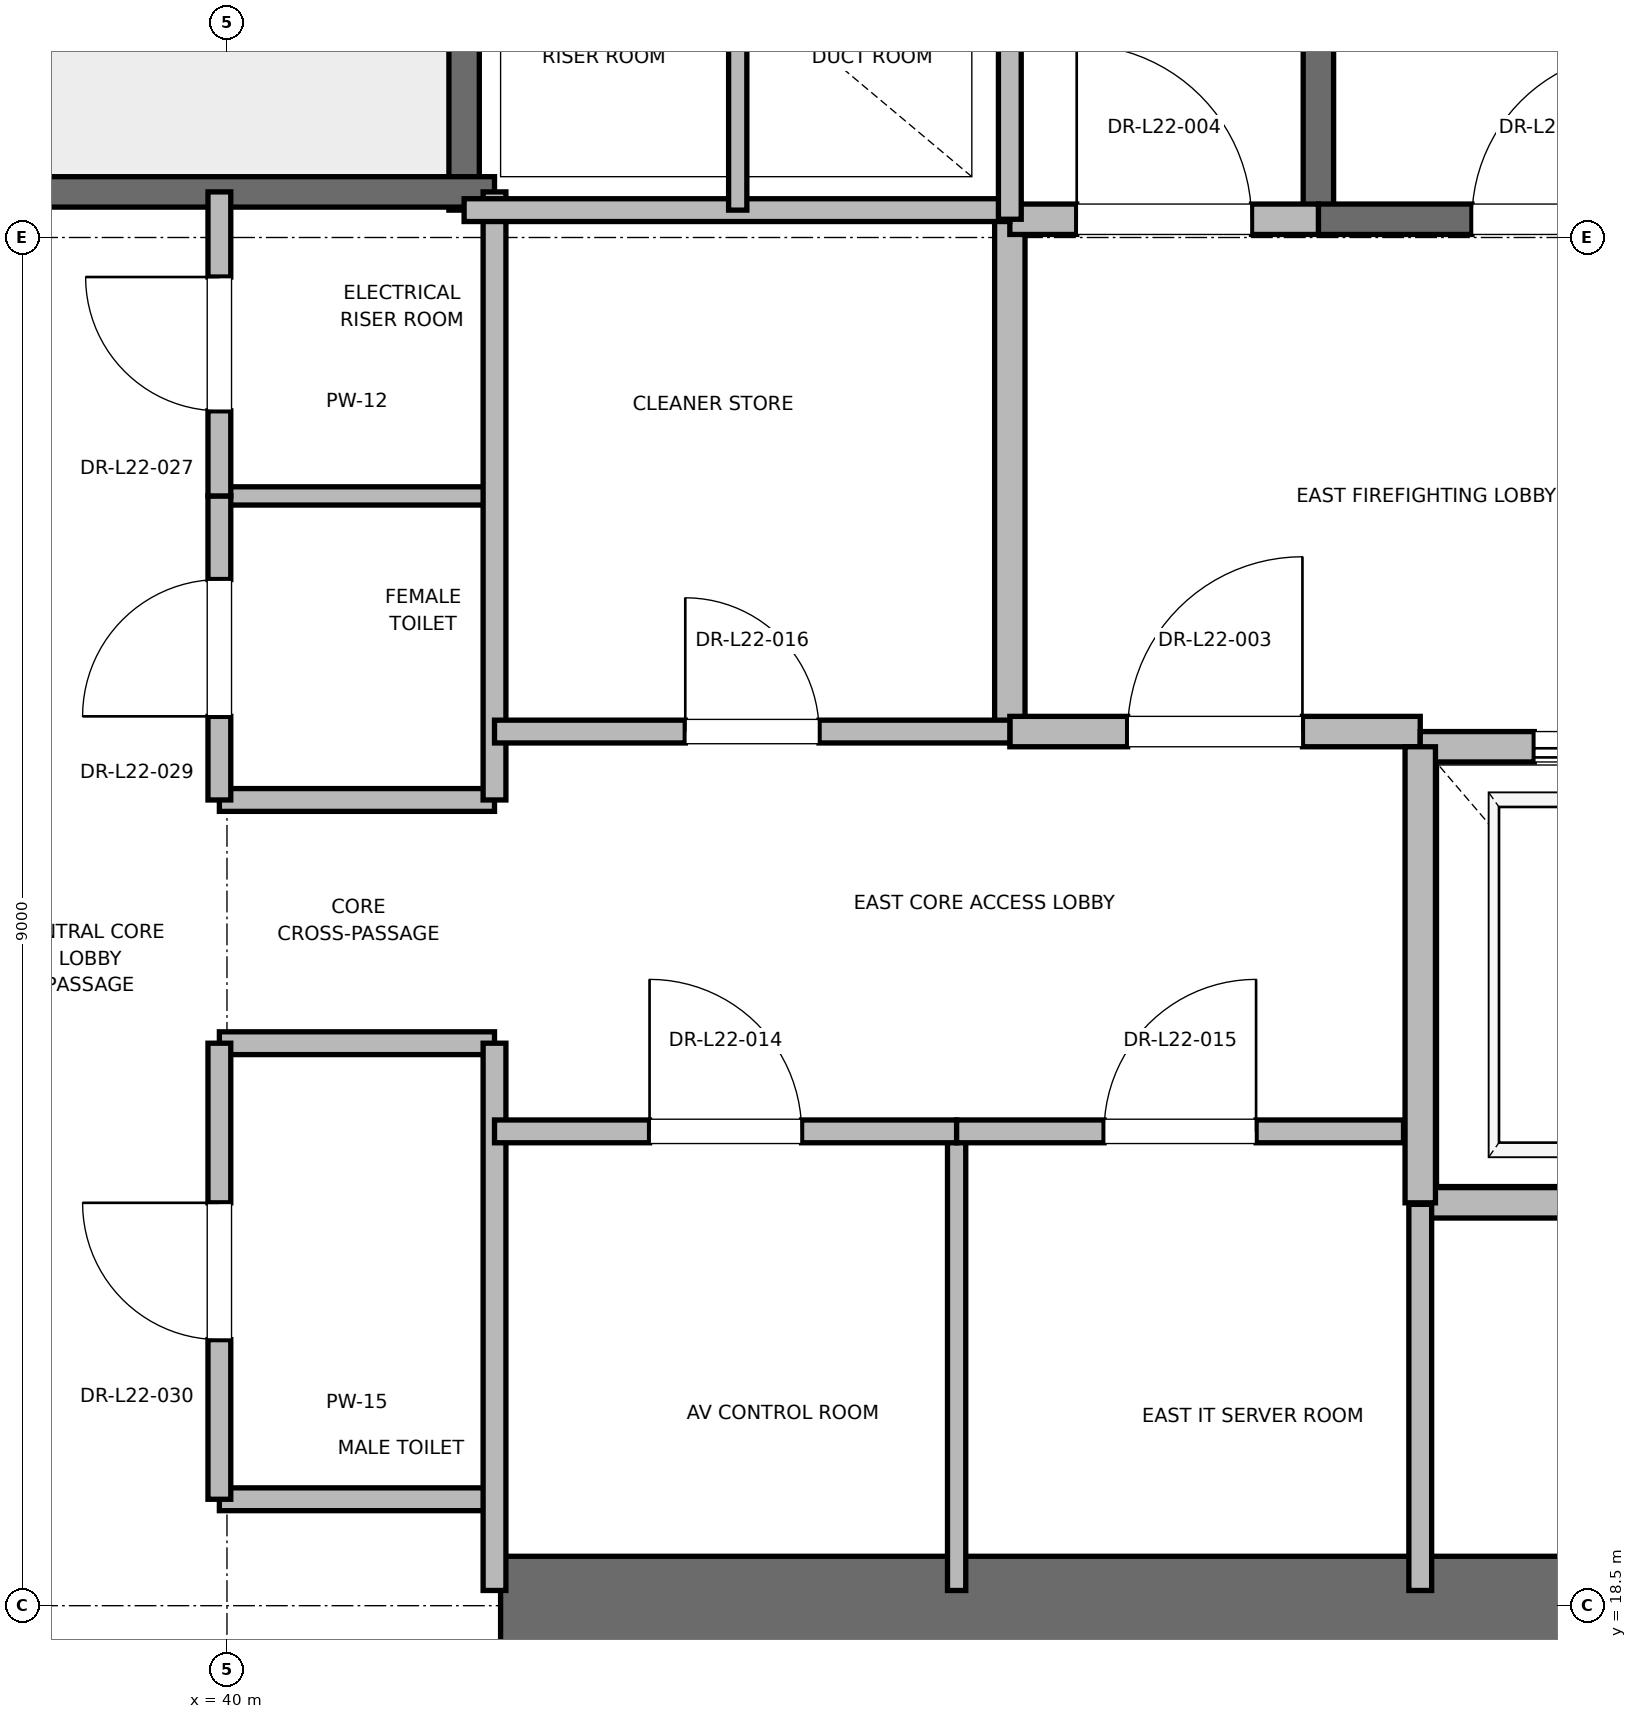
"""IFC4 building model, lengths in metres.
Left out: names, types, materials, properties, quantities, classifications, styles, units other than length and angle.
Written with IfcOpenShell. Run it as: python <this file> out.ifc"""

import sys

from ifc_helpers import new_model, si_unit, direction, frame, frame_2d, origin, place, context, subcontext, project, spatial, rectangle, extrude, element, fill, save


model = new_model("IFC4")
c1 = context("Model", 3, precision=1e-05, world=origin(), true_north=direction((0.0, 1.0)))
c2 = subcontext(c1, "Body", "Model", "MODEL_VIEW")
j1 = project(units=[si_unit("LENGTHUNIT", "METRE"), si_unit("PLANEANGLEUNIT", "RADIAN")], contexts=[c1])
p1 = place(None, origin())
s1 = spatial("IfcSite", under=j1, at=p1, CompositionType="ELEMENT")
p2 = place(p1, origin())
s2 = spatial("IfcBuilding", under=s1, at=p2, CompositionType="ELEMENT")
p3 = place(p2, frame((0.0, 0.0, 95.6)))
s3 = spatial("IfcBuildingStorey", under=s2, at=p3, CompositionType="ELEMENT", Elevation=95.6)
p4 = place(p3, frame((41.8, 18.5, 0.0), z_axis=(0.0, 0.0, 1.0), x_axis=(1.0, 0.0, 0.0)))
e1 = element("IfcWall", 1, at=p4, inside=s3, PredefinedType="SHEAR", context=c2, shape_type="SweptSolid", body=[
    extrude(rectangle(XDim=9.2, YDim=0.65, at=frame_2d((4.6, 0.0))), origin(), (0.0, 0.0, 1.0), 3.76),
])
p5 = place(p3, frame((47.18, 27.62, 0.0), z_axis=(0.0, 0.0, 1.0), x_axis=(0.0, 1.0, 0.0)))
e2 = element("IfcWall", 2, at=p5, inside=s3, PredefinedType="SOLIDWALL", context=c2, shape_type="SweptSolid", body=[
    extrude(rectangle(XDim=8.18, YDim=0.2, at=frame_2d((4.09, 0.0))), origin(), (0.0, 0.0, 1.0), 3.76),
])
p6 = place(p3, frame((47.18, 27.62, 0.0), z_axis=(0.0, 0.0, 1.0), x_axis=(1.0, 0.0, 0.0)))
e3 = element("IfcWall", 3, at=p6, inside=s3, PredefinedType="SOLIDWALL", context=c2, shape_type="SweptSolid", body=[
    extrude(rectangle(XDim=3.12, YDim=0.2, at=frame_2d((1.56, 0.0))), origin(), (0.0, 0.0, 1.0), 3.76),
])
p7 = place(p6, frame((1.01, 0.0, 0.0)))
e4 = element("IfcOpeningElement", 4, at=p7, cuts=e3, PredefinedType="OPENING", context=c2, shape_type="SweptSolid", body=[
    extrude(rectangle(XDim=1.1, YDim=2.15, at=frame_2d((0.55, 1.075))), frame((0.0, 0.1, 0.0), z_axis=(0.0, -1.0, 0.0), x_axis=(1.0, 0.0, 0.0)), (0.0, 0.0, 1.0), 0.2),
])
p8 = place(p3, frame((41.56, 27.68, 0.0), z_axis=(0.0, 0.0, 1.0), x_axis=(0.0, 1.0, 0.0)))
e5 = element("IfcWall", 5, at=p8, inside=s3, PredefinedType="SOLIDWALL", context=c2, shape_type="SweptSolid", body=[
    extrude(rectangle(XDim=8.57, YDim=0.2, at=frame_2d((4.285, 0.0))), origin(), (0.0, 0.0, 1.0), 3.76),
])
p9 = place(p3, frame((38.44, 27.8, 0.0), z_axis=(0.0, 0.0, 1.0), x_axis=(1.0, 0.0, 0.0)))
e6 = element("IfcWall", 6, at=p9, inside=s3, PredefinedType="SOLIDWALL", context=c2, shape_type="SweptSolid", body=[
    extrude(rectangle(XDim=3.32, YDim=0.2, at=frame_2d((1.66, 0.0))), origin(), (0.0, 0.0, 1.0), 3.76),
])
p10 = place(p3, frame((45.15, 24.25, 0.0), z_axis=(0.0, 0.0, 1.0), x_axis=(0.0, 1.0, 0.0)))
e7 = element("IfcWall", 7, at=p10, inside=s3, PredefinedType="PARTITIONING", context=c2, shape_type="SweptSolid", body=[
    extrude(rectangle(XDim=3.37, YDim=0.2, at=frame_2d((1.685, 0.0))), origin(), (0.0, 0.0, 1.0), 3.76),
])
p11 = place(p3, frame((45.15, 24.25, 0.0), z_axis=(0.0, 0.0, 1.0), x_axis=(1.0, 0.0, 0.0)))
e8 = element("IfcWall", 8, at=p11, inside=s3, PredefinedType="PARTITIONING", context=c2, shape_type="SweptSolid", body=[
    extrude(rectangle(XDim=2.7, YDim=0.2, at=frame_2d((1.35, 0.0))), origin(), (0.0, 0.0, 1.0), 3.76),
])
p12 = place(p11, frame((0.775, 0.0, 0.0)))
e9 = element("IfcOpeningElement", 9, at=p12, cuts=e8, PredefinedType="OPENING", context=c2, shape_type="SweptSolid", body=[
    extrude(rectangle(XDim=1.15, YDim=2.2, at=frame_2d((0.575, 1.1))), frame((0.0, 0.1, 0.0), z_axis=(0.0, -1.0, 0.0), x_axis=(1.0, 0.0, 0.0)), (0.0, 0.0, 1.0), 0.2),
])
p13 = place(p3, frame((45.15, 27.62, 0.0), z_axis=(0.0, 0.0, 1.0), x_axis=(1.0, 0.0, 0.0)))
e10 = element("IfcWall", 10, at=p13, inside=s3, PredefinedType="PARTITIONING", context=c2, shape_type="SweptSolid", body=[
    extrude(rectangle(XDim=2.03, YDim=0.2, at=frame_2d((1.015, 0.0))), origin(), (0.0, 0.0, 1.0), 3.76),
])
p14 = place(p13, frame((0.44, 0.0, 0.0)))
e11 = element("IfcOpeningElement", 11, at=p14, cuts=e10, PredefinedType="OPENING", context=c2, shape_type="SweptSolid", body=[
    extrude(rectangle(XDim=1.15, YDim=2.2, at=frame_2d((0.575, 1.1))), frame((0.0, 0.1, 0.0), z_axis=(0.0, -1.0, 0.0), x_axis=(1.0, 0.0, 0.0)), (0.0, 0.0, 1.0), 0.2),
])
p15 = place(p3, frame((47.85, 21.15, 0.0), z_axis=(0.0, 0.0, 1.0), x_axis=(1.0, 0.0, 0.0)))
e12 = element("IfcWall", 12, at=p15, inside=s3, PredefinedType="SOLIDWALL", context=c2, shape_type="SweptSolid", body=[
    extrude(rectangle(XDim=2.6, YDim=0.2, at=frame_2d((1.3, 0.0))), origin(), (0.0, 0.0, 1.0), 3.76),
])
p16 = place(p3, frame((50.45, 24.15, 0.0), z_axis=(0.0, 0.0, 1.0), x_axis=(-1.0, 0.0, 0.0)))
e13 = element("IfcWall", 13, at=p16, inside=s3, PredefinedType="SOLIDWALL", context=c2, shape_type="SweptSolid", body=[
    extrude(rectangle(XDim=2.6, YDim=0.2, at=frame_2d((1.3, 0.0))), origin(), (0.0, 0.0, 1.0), 2.54),
])
p17 = place(p16, frame((0.75, 0.0, 0.0)))
e14 = element("IfcOpeningElement", 14, at=p17, cuts=e13, PredefinedType="OPENING", context=c2, shape_type="SweptSolid", body=[
    extrude(rectangle(XDim=1.1, YDim=2.2, at=frame_2d((0.55, 1.1))), frame((0.0, 0.1, 0.0), z_axis=(0.0, -1.0, 0.0), x_axis=(1.0, 0.0, 0.0)), (0.0, 0.0, 1.0), 0.2),
])
p18 = place(p3, frame((47.85, 24.15, 0.0), z_axis=(0.0, 0.0, 1.0), x_axis=(0.0, -1.0, 0.0)))
e15 = element("IfcWall", 15, at=p18, inside=s3, PredefinedType="SOLIDWALL", context=c2, shape_type="SweptSolid", body=[
    extrude(rectangle(XDim=3.0, YDim=0.2, at=frame_2d((1.5, 0.0))), origin(), (0.0, 0.0, 1.0), 3.76),
])
for number, where, z_axis, x_axis in (
    (16, (39.95, 19.2, 0.0), (0.0, 0.0, 1.0), (1.0, 0.0, 0.0)),
    (17, (39.95, 22.2, 0.0), (0.0, 0.0, 1.0), (1.0, 0.0, 0.0)),
    (18, (39.95, 23.8, 0.0), (0.0, 0.0, 1.0), (1.0, 0.0, 0.0)),
):
    element("IfcWall", number, at=place(p3, frame(where, z_axis=z_axis, x_axis=x_axis)), inside=s3, PredefinedType="PARTITIONING", context=c2, shape_type="SweptSolid", body=[
        extrude(rectangle(XDim=1.81, YDim=0.15, at=frame_2d((0.905, 0.0))), origin(), (0.0, 0.0, 1.0), 2.85),
    ])
p19 = place(p3, frame((39.95, 25.8, 0.0), z_axis=(0.0, 0.0, 1.0), x_axis=(1.0, 0.0, 0.0)))
e19 = element("IfcWall", 19, at=p19, inside=s3, PredefinedType="PARTITIONING", context=c2, shape_type="SweptSolid", body=[
    extrude(rectangle(XDim=1.81, YDim=0.12, at=frame_2d((0.905, 0.0))), origin(), (0.0, 0.0, 1.0), 2.85),
])
p20 = place(p3, frame((41.76, 18.6, 0.0), z_axis=(0.0, 0.0, 1.0), x_axis=(0.0, 1.0, 0.0)))
e20 = element("IfcWall", 20, at=p20, inside=s3, PredefinedType="PARTITIONING", context=c2, shape_type="SweptSolid", body=[
    extrude(rectangle(XDim=3.6, YDim=0.15, at=frame_2d((1.8, 0.0))), origin(), (0.0, 0.0, 1.0), 2.54),
])
p21 = place(p3, frame((41.76, 23.8, 0.0), z_axis=(0.0, 0.0, 1.0), x_axis=(0.0, 1.0, 0.0)))
e21 = element("IfcWall", 21, at=p21, inside=s3, PredefinedType="PARTITIONING", context=c2, shape_type="SweptSolid", body=[
    extrude(rectangle(XDim=4.0, YDim=0.15, at=frame_2d((2.0, 0.0))), origin(), (0.0, 0.0, 1.0), 2.85),
])
p22 = place(p3, frame((39.95, 19.2, 0.0), z_axis=(0.0, 0.0, 1.0), x_axis=(0.0, 1.0, 0.0)))
e22 = element("IfcWall", 22, at=p22, inside=s3, PredefinedType="PARTITIONING", context=c2, shape_type="SweptSolid", body=[
    extrude(rectangle(XDim=3.0, YDim=0.15, at=frame_2d((1.5, 0.0))), origin(), (0.0, 0.0, 1.0), 2.85),
])
p23 = place(p22, frame((1.05, 0.0, 0.0)))
e23 = element("IfcOpeningElement", 23, at=p23, cuts=e22, PredefinedType="OPENING", context=c2, shape_type="SweptSolid", body=[
    extrude(rectangle(XDim=0.9, YDim=2.1, at=frame_2d((0.45, 1.05))), frame((0.0, 0.075, 0.0), z_axis=(0.0, -1.0, 0.0), x_axis=(1.0, 0.0, 0.0)), (0.0, 0.0, 1.0), 0.15),
])
p24 = place(p3, frame((39.95, 23.8, 0.0), z_axis=(0.0, 0.0, 1.0), x_axis=(0.0, 1.0, 0.0)))
e24 = element("IfcWall", 24, at=p24, inside=s3, PredefinedType="PARTITIONING", context=c2, shape_type="SweptSolid", body=[
    extrude(rectangle(XDim=2.0, YDim=0.15, at=frame_2d((1.0, 0.0))), origin(), (0.0, 0.0, 1.0), 2.85),
])
p25 = place(p24, frame((0.55, 0.0, 0.0)))
e25 = element("IfcOpeningElement", 25, at=p25, cuts=e24, PredefinedType="OPENING", context=c2, shape_type="SweptSolid", body=[
    extrude(rectangle(XDim=0.9, YDim=2.1, at=frame_2d((0.45, 1.05))), frame((0.0, 0.075, 0.0), z_axis=(0.0, -1.0, 0.0), x_axis=(1.0, 0.0, 0.0)), (0.0, 0.0, 1.0), 0.15),
])
p26 = place(p3, frame((39.95, 25.8, 0.0), z_axis=(0.0, 0.0, 1.0), x_axis=(0.0, 1.0, 0.0)))
e26 = element("IfcWall", 26, at=p26, inside=s3, PredefinedType="PARTITIONING", context=c2, shape_type="SweptSolid", body=[
    extrude(rectangle(XDim=2.0, YDim=0.15, at=frame_2d((1.0, 0.0))), origin(), (0.0, 0.0, 1.0), 2.85),
])
p27 = place(p26, frame((0.56, 0.0, 0.0)))
e27 = element("IfcOpeningElement", 27, at=p27, cuts=e26, PredefinedType="OPENING", context=c2, shape_type="SweptSolid", body=[
    extrude(rectangle(XDim=0.88, YDim=2.1, at=frame_2d((0.44, 1.05))), frame((0.0, 0.075, 0.0), z_axis=(0.0, -1.0, 0.0), x_axis=(1.0, 0.0, 0.0)), (0.0, 0.0, 1.0), 0.15),
])
p28 = place(p3, frame((41.56, 27.68, 0.0), z_axis=(0.0, 0.0, 1.0), x_axis=(1.0, 0.0, 0.0)))
e28 = element("IfcWall", 28, at=p28, inside=s3, PredefinedType="PARTITIONING", context=c2, shape_type="SweptSolid", body=[
    extrude(rectangle(XDim=3.59, YDim=0.15, at=frame_2d((1.795, 0.0))), origin(), (0.0, 0.0, 1.0), 2.85),
])
p29 = place(p3, frame((47.85, 18.6, 0.0), z_axis=(0.0, 0.0, 1.0), x_axis=(0.0, 1.0, 0.0)))
e29 = element("IfcWall", 29, at=p29, inside=s3, PredefinedType="PARTITIONING", context=c2, shape_type="SweptSolid", body=[
    extrude(rectangle(XDim=2.54, YDim=0.15, at=frame_2d((1.27, 0.0))), origin(), (0.0, 0.0, 1.0), 2.85),
])
p30 = place(p3, frame((44.8, 18.6, 0.0), z_axis=(0.0, 0.0, 1.0), x_axis=(0.0, 1.0, 0.0)))
e30 = element("IfcWall", 30, at=p30, inside=s3, PredefinedType="PARTITIONING", context=c2, shape_type="SweptSolid", body=[
    extrude(rectangle(XDim=3.02, YDim=0.12, at=frame_2d((1.51, 0.0))), origin(), (0.0, 0.0, 1.0), 2.85),
])
p31 = place(p3, frame((41.76, 21.62, 0.0), z_axis=(0.0, 0.0, 1.0), x_axis=(1.0, 0.0, 0.0)))
e31 = element("IfcWall", 31, at=p31, inside=s3, PredefinedType="PARTITIONING", context=c2, shape_type="SweptSolid", body=[
    extrude(rectangle(XDim=3.04, YDim=0.15, at=frame_2d((1.52, 0.0))), origin(), (0.0, 0.0, 1.0), 2.85),
])
p32 = place(p31, frame((1.02, 0.0, 0.0)))
e32 = element("IfcOpeningElement", 32, at=p32, cuts=e31, PredefinedType="OPENING", context=c2, shape_type="SweptSolid", body=[
    extrude(rectangle(XDim=1.0, YDim=2.15, at=frame_2d((0.5, 1.075))), frame((0.0, 0.075, 0.0), z_axis=(0.0, -1.0, 0.0), x_axis=(1.0, 0.0, 0.0)), (0.0, 0.0, 1.0), 0.15),
])
p33 = place(p3, frame((44.8, 21.62, 0.0), z_axis=(0.0, 0.0, 1.0), x_axis=(1.0, 0.0, 0.0)))
e33 = element("IfcWall", 33, at=p33, inside=s3, PredefinedType="PARTITIONING", context=c2, shape_type="SweptSolid", body=[
    extrude(rectangle(XDim=2.94, YDim=0.15, at=frame_2d((1.47, 0.0))), origin(), (0.0, 0.0, 1.0), 2.85),
])
p34 = place(p33, frame((0.97, 0.0, 0.0)))
e34 = element("IfcOpeningElement", 34, at=p34, cuts=e33, PredefinedType="OPENING", context=c2, shape_type="SweptSolid", body=[
    extrude(rectangle(XDim=1.0, YDim=2.15, at=frame_2d((0.5, 1.075))), frame((0.0, 0.075, 0.0), z_axis=(0.0, -1.0, 0.0), x_axis=(1.0, 0.0, 0.0)), (0.0, 0.0, 1.0), 0.15),
])
p35 = place(p3, frame((41.76, 24.25, 0.0), z_axis=(0.0, 0.0, 1.0), x_axis=(1.0, 0.0, 0.0)))
e35 = element("IfcWall", 35, at=p35, inside=s3, PredefinedType="PARTITIONING", context=c2, shape_type="SweptSolid", body=[
    extrude(rectangle(XDim=3.39, YDim=0.15, at=frame_2d((1.695, 0.0))), origin(), (0.0, 0.0, 1.0), 2.85),
])
p36 = place(p35, frame((1.255, 0.0, 0.0)))
e36 = element("IfcOpeningElement", 36, at=p36, cuts=e35, PredefinedType="OPENING", context=c2, shape_type="SweptSolid", body=[
    extrude(rectangle(XDim=0.88, YDim=2.1, at=frame_2d((0.44, 1.05))), frame((0.0, 0.075, 0.0), z_axis=(0.0, -1.0, 0.0), x_axis=(1.0, 0.0, 0.0)), (0.0, 0.0, 1.0), 0.15),
])
p37 = place(p3, frame((45.15, 27.62, 0.0), z_axis=(0.0, 0.0, 1.0), x_axis=(0.0, 1.0, 0.0)))
e37 = element("IfcWall", 37, at=p37, inside=s3, PredefinedType="PARTITIONING", context=c2, shape_type="SweptSolid", body=[
    extrude(rectangle(XDim=3.1, YDim=0.15, at=frame_2d((1.55, 0.0))), origin(), (0.0, 0.0, 1.0), 2.85),
])
p38 = place(p3, frame((43.36, 27.68, 0.0), z_axis=(0.0, 0.0, 1.0), x_axis=(0.0, 1.0, 0.0)))
e38 = element("IfcWall", 38, at=p38, inside=s3, PredefinedType="PARTITIONING", context=c2, shape_type="SweptSolid", body=[
    extrude(rectangle(XDim=3.04, YDim=0.12, at=frame_2d((1.52, 0.0))), origin(), (0.0, 0.0, 1.0), 2.85),
])
p39 = place(p7, origin())
e39 = element("IfcDoor", 39, at=p39, inside=s3, OperationType="SINGLE_SWING_RIGHT", PredefinedType="DOOR", context=c2, shape_type="SweptSolid", body=[
    extrude(rectangle(XDim=1.1, YDim=2.15, at=frame_2d((0.55, 1.075))), frame((0.0, 0.025, 0.0), z_axis=(0.0, -1.0, 0.0), x_axis=(1.0, 0.0, 0.0)), (0.0, 0.0, 1.0), 0.05),
])
fill(e4, e39)
p40 = place(p12, origin())
e40 = element("IfcDoor", 40, at=p40, inside=s3, OperationType="SINGLE_SWING_RIGHT", PredefinedType="DOOR", context=c2, shape_type="SweptSolid", body=[
    extrude(rectangle(XDim=1.15, YDim=2.2, at=frame_2d((0.575, 1.1))), frame((0.0, 0.025, 0.0), z_axis=(0.0, -1.0, 0.0), x_axis=(1.0, 0.0, 0.0)), (0.0, 0.0, 1.0), 0.05),
])
fill(e9, e40)
p41 = place(p14, origin())
e41 = element("IfcDoor", 41, at=p41, inside=s3, OperationType="SINGLE_SWING_LEFT", PredefinedType="DOOR", context=c2, shape_type="SweptSolid", body=[
    extrude(rectangle(XDim=1.15, YDim=2.2, at=frame_2d((0.575, 1.1))), frame((0.0, 0.025, 0.0), z_axis=(0.0, -1.0, 0.0), x_axis=(1.0, 0.0, 0.0)), (0.0, 0.0, 1.0), 0.05),
])
fill(e11, e41)
p42 = place(p17, origin())
e42 = element("IfcDoor", 42, at=p42, inside=s3, OperationType="SLIDING_TO_RIGHT", PredefinedType="DOOR", context=c2, shape_type="SweptSolid", body=[
    extrude(rectangle(XDim=1.1, YDim=2.2, at=frame_2d((0.55, 1.1))), frame((0.0, 0.025, 0.0), z_axis=(0.0, -1.0, 0.0), x_axis=(1.0, 0.0, 0.0)), (0.0, 0.0, 1.0), 0.05),
])
fill(e14, e42)
p43 = place(p23, origin())
e43 = element("IfcDoor", 43, at=p43, inside=s3, OperationType="SINGLE_SWING_RIGHT", PredefinedType="DOOR", context=c2, shape_type="SweptSolid", body=[
    extrude(rectangle(XDim=0.9, YDim=2.1, at=frame_2d((0.45, 1.05))), frame((0.0, 0.025, 0.0), z_axis=(0.0, -1.0, 0.0), x_axis=(1.0, 0.0, 0.0)), (0.0, 0.0, 1.0), 0.05),
])
fill(e23, e43)
p44 = place(p25, origin())
e44 = element("IfcDoor", 44, at=p44, inside=s3, OperationType="SINGLE_SWING_LEFT", PredefinedType="DOOR", context=c2, shape_type="SweptSolid", body=[
    extrude(rectangle(XDim=0.9, YDim=2.1, at=frame_2d((0.45, 1.05))), frame((0.0, 0.025, 0.0), z_axis=(0.0, -1.0, 0.0), x_axis=(1.0, 0.0, 0.0)), (0.0, 0.0, 1.0), 0.05),
])
fill(e25, e44)
p45 = place(p27, origin())
e45 = element("IfcDoor", 45, at=p45, inside=s3, OperationType="SINGLE_SWING_RIGHT", PredefinedType="DOOR", context=c2, shape_type="SweptSolid", body=[
    extrude(rectangle(XDim=0.88, YDim=2.1, at=frame_2d((0.44, 1.05))), frame((0.0, 0.025, 0.0), z_axis=(0.0, -1.0, 0.0), x_axis=(1.0, 0.0, 0.0)), (0.0, 0.0, 1.0), 0.05),
])
fill(e27, e45)
p46 = place(p32, origin())
e46 = element("IfcDoor", 46, at=p46, inside=s3, OperationType="SINGLE_SWING_LEFT", PredefinedType="DOOR", context=c2, shape_type="SweptSolid", body=[
    extrude(rectangle(XDim=1.0, YDim=2.15, at=frame_2d((0.5, 1.075))), frame((0.0, 0.025, 0.0), z_axis=(0.0, -1.0, 0.0), x_axis=(1.0, 0.0, 0.0)), (0.0, 0.0, 1.0), 0.05),
])
fill(e32, e46)
p47 = place(p34, origin())
e47 = element("IfcDoor", 47, at=p47, inside=s3, OperationType="SINGLE_SWING_RIGHT", PredefinedType="DOOR", context=c2, shape_type="SweptSolid", body=[
    extrude(rectangle(XDim=1.0, YDim=2.15, at=frame_2d((0.5, 1.075))), frame((0.0, 0.025, 0.0), z_axis=(0.0, -1.0, 0.0), x_axis=(1.0, 0.0, 0.0)), (0.0, 0.0, 1.0), 0.05),
])
fill(e34, e47)
p48 = place(p36, origin())
e48 = element("IfcDoor", 48, at=p48, inside=s3, OperationType="SINGLE_SWING_LEFT", PredefinedType="DOOR", context=c2, shape_type="SweptSolid", body=[
    extrude(rectangle(XDim=0.88, YDim=2.1, at=frame_2d((0.44, 1.05))), frame((0.0, 0.025, 0.0), z_axis=(0.0, -1.0, 0.0), x_axis=(1.0, 0.0, 0.0)), (0.0, 0.0, 1.0), 0.05),
])
fill(e36, e48)
save(model, sys.argv[1])
